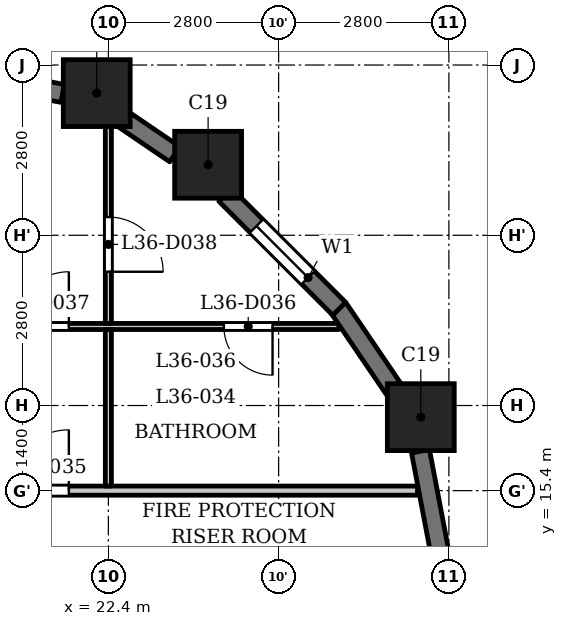
"""IFC4 building model, lengths in metres.
Left out: names, types, materials, properties, quantities, classifications, styles, units other than length and angle.
Written with IfcOpenShell. Run it as: python <this file> out.ifc"""

import sys

from ifc_helpers import new_model, si_unit, direction, frame, frame_2d, origin, origin_2d, place, context, subcontext, project, spatial, rectangle, extrude, element, fill, save


model = new_model("IFC4")
c1 = context("Model", 3, precision=1e-05, world=origin(), true_north=direction((0.0, 1.0)))
c2 = subcontext(c1, "Body", "Model", "MODEL_VIEW")
j1 = project(units=[si_unit("LENGTHUNIT", "METRE"), si_unit("PLANEANGLEUNIT", "RADIAN")], contexts=[c1])
p1 = place(None, origin())
s1 = spatial("IfcSite", under=j1, at=p1, CompositionType="ELEMENT")
p2 = place(p1, origin())
s2 = spatial("IfcBuilding", under=s1, at=p2, CompositionType="ELEMENT")
p3 = place(p2, frame((0.0, 0.0, 143.1)))
s3 = spatial("IfcBuildingStorey", under=s2, at=p3, CompositionType="ELEMENT", Elevation=143.1)
for number, where, z_axis, x_axis in (
    (1, (27.538, 16.609, 0.0), (0.0, 0.0, 1.0), (1.0, 0.0, 0.0)),
    (2, (24.04, 20.76, 0.0), (0.0, 0.0, 1.0), (1.0, 0.0, 0.0)),
    (3, (22.209, 21.938, 0.0), (0.0, 0.0, 1.0), (1.0, 0.0, 0.0)),
):
    element("IfcColumn", number, at=place(p3, frame(where, z_axis=z_axis, x_axis=x_axis)), inside=s3, PredefinedType="COLUMN", context=c2, shape_type="SweptSolid", body=[
        extrude(rectangle(XDim=1.1, YDim=1.1, at=origin_2d()), origin(), (0.0, 0.0, 1.0), 3.5),
    ])
p4 = place(p3, frame((27.853, 14.372, 0.0), z_axis=(0.0, 0.0, 1.0), x_axis=(-0.187302784601, 0.982302227871, 0.0)))
e4 = element("IfcWall", 4, at=p4, inside=s3, PredefinedType="SOLIDWALL", context=c2, shape_type="SweptSolid", body=[
    extrude(rectangle(XDim=1.706, YDim=0.3, at=frame_2d((0.853, 0.0))), origin(), (0.0, 0.0, 1.0), 2.45),
])
p5 = place(p3, frame((27.138, 17.002, 0.0), z_axis=(0.0, 0.0, 1.0), x_axis=(-0.562075160946, 0.827086158419, 0.0)))
e5 = element("IfcWall", 5, at=p5, inside=s3, PredefinedType="SOLIDWALL", context=c2, shape_type="SweptSolid", body=[
    extrude(rectangle(XDim=1.706, YDim=0.3, at=frame_2d((0.853, 0.0))), origin(), (0.0, 0.0, 1.0), 2.45),
])
p6 = place(p3, frame((26.197, 18.391, 0.0), z_axis=(0.0, 0.0, 1.0), x_axis=(-0.707060717099, 0.707152842274, 0.0)))
e6 = element("IfcWall", 6, at=p6, inside=s3, PredefinedType="SOLIDWALL", context=c2, shape_type="SweptSolid", body=[
    extrude(rectangle(XDim=2.65, YDim=0.3, at=frame_2d((1.325, 0.0))), origin(), (0.0, 0.0, 1.0), 2.45),
])
p7 = place(p6, frame((0.725, 0.0, 0.6)))
e7 = element("IfcOpeningElement", 7, at=p7, cuts=e6, PredefinedType="OPENING", context=c2, shape_type="SweptSolid", body=[
    extrude(rectangle(XDim=1.2, YDim=1.55, at=frame_2d((0.6, 0.775))), frame((0.0, 0.16, 0.0), z_axis=(0.0, -1.0, 0.0), x_axis=(1.0, 0.0, 0.0)), (0.0, 0.0, 1.0), 0.32),
])
p8 = place(p3, frame((23.492, 20.932, 0.0), z_axis=(0.0, 0.0, 1.0), x_axis=(-0.826993959827, 0.562210806023, 0.0)))
e8 = element("IfcWall", 8, at=p8, inside=s3, PredefinedType="SOLIDWALL", context=c2, shape_type="SweptSolid", body=[
    extrude(rectangle(XDim=1.077, YDim=0.3, at=frame_2d((0.539, 0.0))), origin(), (0.0, 0.0, 1.0), 3.2),
])
p9 = place(p3, frame((21.648, 21.933, 0.0), z_axis=(0.0, 0.0, 1.0), x_axis=(-0.982297206936, 0.187329114784, 0.0)))
e9 = element("IfcWall", 9, at=p9, inside=s3, PredefinedType="SOLIDWALL", context=c2, shape_type="SweptSolid", body=[
    extrude(rectangle(XDim=1.706, YDim=0.3, at=frame_2d((0.853, 0.0))), origin(), (0.0, 0.0, 1.0), 2.45),
])
p10 = place(p9, frame((0.453, 0.0, 0.6)))
e10 = element("IfcOpeningElement", 10, at=p10, cuts=e9, PredefinedType="OPENING", context=c2, shape_type="SweptSolid", body=[
    extrude(rectangle(XDim=0.8, YDim=1.55, at=frame_2d((0.4, 0.775))), frame((0.0, 0.16, 0.0), z_axis=(0.0, -1.0, 0.0), x_axis=(1.0, 0.0, 0.0)), (0.0, 0.0, 1.0), 0.32),
])
p11 = place(p3, frame((14.925, 15.4, 0.0), z_axis=(0.0, 0.0, 1.0), x_axis=(1.0, 0.0, 0.0)))
e11 = element("IfcWall", 11, at=p11, inside=s3, PredefinedType="PARTITIONING", context=c2, shape_type="SweptSolid", body=[
    extrude(rectangle(XDim=12.559, YDim=0.15, at=frame_2d((6.279, 0.0))), origin(), (0.0, 0.0, 1.0), 3.2),
])
p12 = place(p11, frame((5.825, 0.0, 0.0)))
e12 = element("IfcOpeningElement", 12, at=p12, cuts=e11, PredefinedType="OPENING", context=c2, shape_type="SweptSolid", body=[
    extrude(rectangle(XDim=1.0, YDim=2.1, at=frame_2d((0.5, 1.05))), frame((0.0, 0.085, 0.0), z_axis=(0.0, -1.0, 0.0), x_axis=(1.0, 0.0, 0.0)), (0.0, 0.0, 1.0), 0.17),
])
p13 = place(p3, frame((16.875, 18.1, 0.0), z_axis=(0.0, 0.0, 1.0), x_axis=(1.0, 0.0, 0.0)))
e13 = element("IfcWall", 13, at=p13, inside=s3, PredefinedType="PARTITIONING", context=c2, shape_type="SweptSolid", body=[
    extrude(rectangle(XDim=9.315, YDim=0.1, at=frame_2d((4.658, 0.0))), origin(), (0.0, 0.0, 1.0), 3.2),
])
p14 = place(p13, frame((7.425, 0.0, 0.0)))
e14 = element("IfcOpeningElement", 14, at=p14, cuts=e13, PredefinedType="OPENING", context=c2, shape_type="SweptSolid", body=[
    extrude(rectangle(XDim=0.8, YDim=2.1, at=frame_2d((0.4, 1.05))), frame((0.0, 0.06, 0.0), z_axis=(0.0, -1.0, 0.0), x_axis=(1.0, 0.0, 0.0)), (0.0, 0.0, 1.0), 0.12),
])
p15 = place(p13, frame((3.975, 0.0, 0.0)))
e15 = element("IfcOpeningElement", 15, at=p15, cuts=e13, PredefinedType="OPENING", context=c2, shape_type="SweptSolid", body=[
    extrude(rectangle(XDim=0.9, YDim=2.1, at=frame_2d((0.45, 1.05))), frame((0.0, 0.06, 0.0), z_axis=(0.0, -1.0, 0.0), x_axis=(1.0, 0.0, 0.0)), (0.0, 0.0, 1.0), 0.12),
])
p16 = place(p3, frame((22.4, 15.475, 0.0), z_axis=(0.0, 0.0, 1.0), x_axis=(0.0, 1.0, 0.0)))
e16 = element("IfcWall", 16, at=p16, inside=s3, PredefinedType="PARTITIONING", context=c2, shape_type="SweptSolid", body=[
    extrude(rectangle(XDim=2.575, YDim=0.1, at=frame_2d((1.288, 0.0))), origin(), (0.0, 0.0, 1.0), 3.2),
])
p17 = place(p3, frame((22.4, 18.15, 0.0), z_axis=(0.0, 0.0, 1.0), x_axis=(0.0, 1.0, 0.0)))
e17 = element("IfcWall", 17, at=p17, inside=s3, PredefinedType="PARTITIONING", context=c2, shape_type="SweptSolid", body=[
    extrude(rectangle(XDim=3.57, YDim=0.1, at=frame_2d((1.785, 0.0))), origin(), (0.0, 0.0, 1.0), 3.2),
])
p18 = place(p17, frame((0.85, 0.0, 0.0)))
e18 = element("IfcOpeningElement", 18, at=p18, cuts=e17, PredefinedType="OPENING", context=c2, shape_type="SweptSolid", body=[
    extrude(rectangle(XDim=0.9, YDim=2.1, at=frame_2d((0.45, 1.05))), frame((0.0, 0.06, 0.0), z_axis=(0.0, -1.0, 0.0), x_axis=(1.0, 0.0, 0.0)), (0.0, 0.0, 1.0), 0.12),
])
p19 = place(p12, origin())
e19 = element("IfcDoor", 19, at=p19, inside=s3, OperationType="SINGLE_SWING_LEFT", PredefinedType="DOOR", context=c2, shape_type="SweptSolid", body=[
    extrude(rectangle(XDim=1.0, YDim=2.1, at=frame_2d((0.5, 1.05))), frame((0.0, 0.025, 0.0), z_axis=(0.0, -1.0, 0.0), x_axis=(1.0, 0.0, 0.0)), (0.0, 0.0, 1.0), 0.05),
])
fill(e12, e19)
p20 = place(p14, origin())
e20 = element("IfcDoor", 20, at=p20, inside=s3, OperationType="SINGLE_SWING_RIGHT", PredefinedType="DOOR", context=c2, shape_type="SweptSolid", body=[
    extrude(rectangle(XDim=0.8, YDim=2.1, at=frame_2d((0.4, 1.05))), frame((0.0, 0.025, 0.0), z_axis=(0.0, -1.0, 0.0), x_axis=(1.0, 0.0, 0.0)), (0.0, 0.0, 1.0), 0.05),
])
fill(e14, e20)
p21 = place(p15, origin())
e21 = element("IfcDoor", 21, at=p21, inside=s3, OperationType="SINGLE_SWING_LEFT", PredefinedType="DOOR", context=c2, shape_type="SweptSolid", body=[
    extrude(rectangle(XDim=0.9, YDim=2.1, at=frame_2d((0.45, 1.05))), frame((0.0, 0.025, 0.0), z_axis=(0.0, -1.0, 0.0), x_axis=(1.0, 0.0, 0.0)), (0.0, 0.0, 1.0), 0.05),
])
fill(e15, e21)
p22 = place(p18, origin())
e22 = element("IfcDoor", 22, at=p22, inside=s3, OperationType="SINGLE_SWING_LEFT", PredefinedType="DOOR", context=c2, shape_type="SweptSolid", body=[
    extrude(rectangle(XDim=0.9, YDim=2.1, at=frame_2d((0.45, 1.05))), frame((0.0, 0.025, 0.0), z_axis=(0.0, -1.0, 0.0), x_axis=(1.0, 0.0, 0.0)), (0.0, 0.0, 1.0), 0.05),
])
fill(e18, e22)
p23 = place(p7, origin())
e23 = element("IfcWindow", 23, at=p23, inside=s3, PartitioningType="SINGLE_PANEL", PredefinedType="WINDOW", context=c2, shape_type="SweptSolid", body=[
    extrude(rectangle(XDim=1.2, YDim=1.55, at=frame_2d((0.6, 0.775))), frame((0.0, 0.03, 0.0), z_axis=(0.0, -1.0, 0.0), x_axis=(1.0, 0.0, 0.0)), (0.0, 0.0, 1.0), 0.06),
])
fill(e7, e23)
save(model, sys.argv[1])
